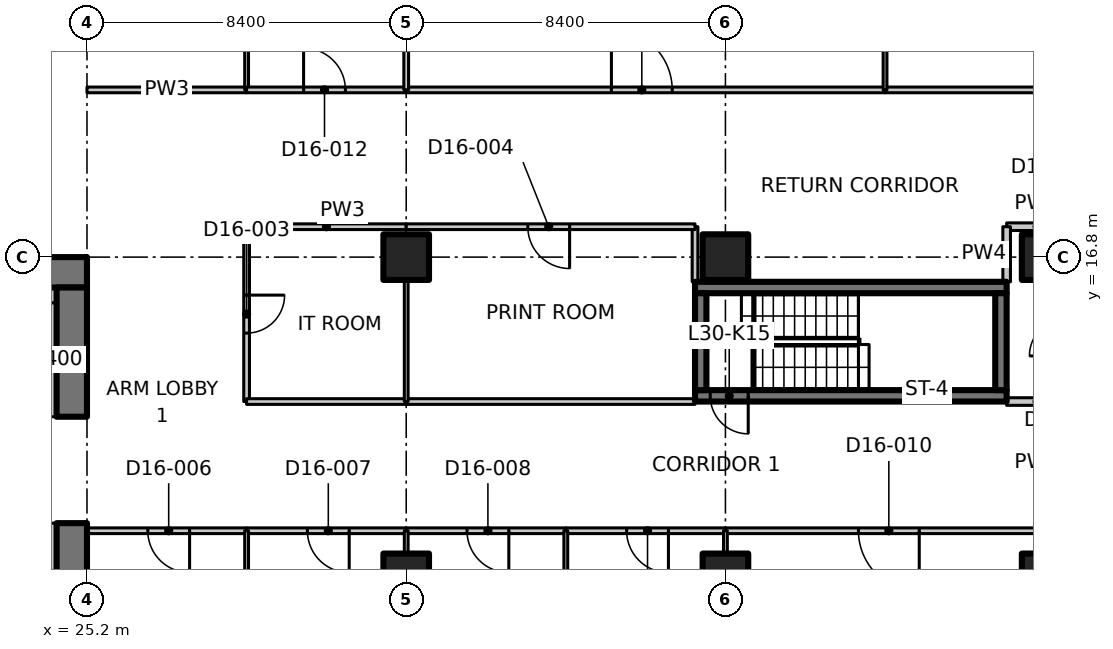
"""IFC4 building model, lengths in metres.
Left out: names, types, materials, properties, quantities, classifications, styles, units other than length and angle.
Written with IfcOpenShell. Run it as: python <this file> out.ifc"""

import sys

from ifc_helpers import new_model, si_unit, direction, frame, frame_2d, origin, origin_2d, place, context, subcontext, project, spatial, polyline, rectangle, outline, extrude, element, fill, save


model = new_model("IFC4")
c1 = context("Model", 3, precision=1e-05, world=origin(), true_north=direction((0.0, 1.0)))
c2 = subcontext(c1, "Body", "Model", "MODEL_VIEW")
j1 = project(units=[si_unit("LENGTHUNIT", "METRE"), si_unit("PLANEANGLEUNIT", "RADIAN")], contexts=[c1])
p1 = place(None, origin())
s1 = spatial("IfcSite", under=j1, at=p1, CompositionType="ELEMENT")
p2 = place(p1, origin())
s2 = spatial("IfcBuilding", under=s1, at=p2, CompositionType="ELEMENT")
p3 = place(p2, frame((0.0, 0.0, 124.1)))
s3 = spatial("IfcBuildingStorey", under=s2, at=p3, CompositionType="ELEMENT", Elevation=124.1)
for number, where, z_axis, x_axis in (
    (1, (33.6, 8.4, 0.0), (0.0, 0.0, 1.0), (1.0, 0.0, 0.0)),
    (2, (33.6, 16.8, 0.0), (0.0, 0.0, 1.0), (1.0, 0.0, 0.0)),
    (3, (42.0, 8.4, 0.0), (0.0, 0.0, 1.0), (1.0, 0.0, 0.0)),
    (4, (42.0, 16.8, 0.0), (0.0, 0.0, 1.0), (1.0, 0.0, 0.0)),
    (5, (50.4, 8.4, 0.0), (0.0, 0.0, 1.0), (1.0, 0.0, 0.0)),
    (6, (50.4, 16.8, 0.0), (0.0, 0.0, 1.0), (1.0, 0.0, 0.0)),
):
    element("IfcColumn", number, at=place(p3, frame(where, z_axis=z_axis, x_axis=x_axis)), inside=s3, PredefinedType="COLUMN", context=c2, shape_type="SweptSolid", body=[
        extrude(rectangle(XDim=1.2, YDim=1.2, at=origin_2d()), origin(), (0.0, 0.0, 1.0), 3.35),
    ])
p4 = place(p3, frame((23.8, 16.4, 0.0), z_axis=(0.0, 0.0, 1.0), x_axis=(1.0, 0.0, 0.0)))
e7 = element("IfcWall", 7, at=p4, inside=s3, PredefinedType="SHEAR", context=c2, shape_type="SweptSolid", body=[
    extrude(rectangle(XDim=1.4, YDim=0.8, at=frame_2d((0.7, 0.0))), origin(), (0.0, 0.0, 1.0), 3.35),
])
p5 = place(p3, frame((24.8, 0.8, 0.0), z_axis=(0.0, 0.0, 1.0), x_axis=(0.0, 1.0, 0.0)))
e8 = element("IfcWall", 8, at=p5, inside=s3, PredefinedType="SHEAR", context=c2, shape_type="SweptSolid", body=[
    extrude(rectangle(XDim=9.0, YDim=0.8, at=frame_2d((4.5, 0.0))), origin(), (0.0, 0.0, 1.0), 3.35),
])
p6 = place(p3, frame((24.8, 12.6, 0.0), z_axis=(0.0, 0.0, 1.0), x_axis=(0.0, 1.0, 0.0)))
e9 = element("IfcWall", 9, at=p6, inside=s3, PredefinedType="SHEAR", context=c2, shape_type="SweptSolid", body=[
    extrude(rectangle(XDim=3.4, YDim=0.8, at=frame_2d((1.7, 0.0))), origin(), (0.0, 0.0, 1.0), 3.35),
])
p7 = place(p3, frame((24.2, 12.6, 0.0), z_axis=(0.0, 0.0, 1.0), x_axis=(0.0, 1.0, 0.0)))
e10 = element("IfcWall", 10, at=p7, inside=s3, PredefinedType="PARTITIONING", context=c2, shape_type="SweptSolid", body=[
    extrude(rectangle(XDim=3.0, YDim=0.4, at=frame_2d((1.5, 0.0))), origin(), (0.0, 0.0, 1.0), 3.35),
])
p8 = place(p3, frame((23.8, 15.8, 0.0), z_axis=(0.0, 0.0, 1.0), x_axis=(1.0, 0.0, 0.0)))
e11 = element("IfcWall", 11, at=p8, inside=s3, PredefinedType="PARTITIONING", context=c2, shape_type="SweptSolid", body=[
    extrude(rectangle(XDim=0.6, YDim=0.4, at=frame_2d((0.3, 0.0))), origin(), (0.0, 0.0, 1.0), 3.35),
])
p9 = place(p3, frame((49.4, 13.15, 0.0), z_axis=(0.0, 0.0, 1.0), x_axis=(-1.0, 0.0, 0.0)))
e12 = element("IfcWall", 12, at=p9, inside=s3, PredefinedType="SHEAR", context=c2, shape_type="SweptSolid", body=[
    extrude(rectangle(XDim=8.2, YDim=0.3, at=frame_2d((4.1, 0.0))), origin(), (0.0, 0.0, 1.0), 3.35),
])
p10 = place(p9, frame((6.8, 0.0, 0.0)))
e13 = element("IfcOpeningElement", 13, at=p10, cuts=e12, PredefinedType="OPENING", context=c2, shape_type="SweptSolid", body=[
    extrude(rectangle(XDim=1.0, YDim=2.1, at=frame_2d((0.5, 1.05))), frame((0.0, 0.16, 0.0), z_axis=(0.0, -1.0, 0.0), x_axis=(1.0, 0.0, 0.0)), (0.0, 0.0, 1.0), 0.32),
])
p11 = place(p3, frame((41.2, 16.0, 0.0), z_axis=(0.0, 0.0, 1.0), x_axis=(1.0, 0.0, 0.0)))
e14 = element("IfcWall", 14, at=p11, inside=s3, PredefinedType="SHEAR", context=c2, shape_type="SweptSolid", body=[
    extrude(rectangle(XDim=8.2, YDim=0.3, at=frame_2d((4.1, 0.0))), origin(), (0.0, 0.0, 1.0), 3.35),
])
for number, where, z_axis, x_axis in (
    (15, (41.35, 13.3, 0.0), (0.0, 0.0, 1.0), (0.0, 1.0, 0.0)),
    (16, (49.25, 13.3, 0.0), (0.0, 0.0, 1.0), (0.0, 1.0, 0.0)),
):
    element("IfcWall", number, at=place(p3, frame(where, z_axis=z_axis, x_axis=x_axis)), inside=s3, PredefinedType="SHEAR", context=c2, shape_type="SweptSolid", body=[
        extrude(rectangle(XDim=2.55, YDim=0.3, at=frame_2d((1.275, 0.0))), origin(), (0.0, 0.0, 1.0), 3.35),
    ])
p12 = place(p3, frame((24.2, 4.35, 0.0), z_axis=(0.0, 0.0, 1.0), x_axis=(0.0, 1.0, 0.0)))
e17 = element("IfcWall", 17, at=p12, inside=s3, PredefinedType="PARTITIONING", context=c2, shape_type="SweptSolid", body=[
    extrude(rectangle(XDim=5.45, YDim=0.4, at=frame_2d((2.725, 0.0))), origin(), (0.0, 0.0, 1.0), 3.35),
])
p13 = place(p3, frame((25.2, 21.2, 0.0), z_axis=(0.0, 0.0, 1.0), x_axis=(1.0, 0.0, 0.0)))
e18 = element("IfcWall", 18, at=p13, inside=s3, PredefinedType="PARTITIONING", context=c2, shape_type="SweptSolid", body=[
    extrude(rectangle(XDim=4.2, YDim=0.15, at=frame_2d((2.1, 0.0))), origin(), (0.0, 0.0, 1.0), 3.33),
])
p14 = place(p3, frame((29.4, 17.6, 0.0), z_axis=(0.0, 0.0, 1.0), x_axis=(0.0, -1.0, 0.0)))
e19 = element("IfcWall", 19, at=p14, inside=s3, PredefinedType="PARTITIONING", context=c2, shape_type="SweptSolid", body=[
    extrude(rectangle(XDim=4.6, YDim=0.15, at=frame_2d((2.3, 0.0))), origin(), (0.0, 0.0, 1.0), 3.33),
])
p15 = place(p14, frame((1.8, 0.0, 0.0)))
e20 = element("IfcOpeningElement", 20, at=p15, cuts=e19, PredefinedType="OPENING", context=c2, shape_type="SweptSolid", body=[
    extrude(rectangle(XDim=1.0, YDim=2.1, at=frame_2d((0.5, 1.05))), frame((0.0, 0.085, 0.0), z_axis=(0.0, -1.0, 0.0), x_axis=(1.0, 0.0, 0.0)), (0.0, 0.0, 1.0), 0.17),
])
p16 = place(p3, frame((29.4, 9.6, 0.0), z_axis=(0.0, 0.0, 1.0), x_axis=(-1.0, 0.0, 0.0)))
e21 = element("IfcWall", 21, at=p16, inside=s3, PredefinedType="PARTITIONING", context=c2, shape_type="SweptSolid", body=[
    extrude(rectangle(XDim=4.2, YDim=0.15, at=frame_2d((2.1, 0.0))), origin(), (0.0, 0.0, 1.0), 3.33),
])
p17 = place(p16, frame((1.5, 0.0, 0.0)))
e22 = element("IfcOpeningElement", 22, at=p17, cuts=e21, PredefinedType="OPENING", context=c2, shape_type="SweptSolid", body=[
    extrude(rectangle(XDim=1.1, YDim=2.1, at=frame_2d((0.55, 1.05))), frame((0.0, 0.085, 0.0), z_axis=(0.0, -1.0, 0.0), x_axis=(1.0, 0.0, 0.0)), (0.0, 0.0, 1.0), 0.17),
])
p18 = place(p3, frame((29.4, 27.429, 0.0), z_axis=(0.0, 0.0, 1.0), x_axis=(0.0, -1.0, 0.0)))
e23 = element("IfcWall", 23, at=p18, inside=s3, PredefinedType="PARTITIONING", context=c2, shape_type="SweptSolid", body=[
    extrude(outline(polyline([(0.0, 0.0), (6.229, 0.0), (6.229, 3.33), (2.679, 3.33), (2.677, 2.98), (1.781, 2.98), (1.779, 3.33), (0.154, 3.33), (0.0, 3.33), (0.0, 0.0)])), frame((0.0, 0.05, 0.0), z_axis=(0.0, -1.0, 0.0), x_axis=(1.0, 0.0, 0.0)), (0.0, 0.0, 1.0), 0.1),
])
p19 = place(p3, frame((29.4, 13.0, 0.0), z_axis=(0.0, 0.0, 1.0), x_axis=(1.0, 0.0, 0.0)))
e24 = element("IfcWall", 24, at=p19, inside=s3, PredefinedType="PARTITIONING", context=c2, shape_type="SweptSolid", body=[
    extrude(rectangle(XDim=4.2, YDim=0.15, at=frame_2d((2.1, 0.0))), origin(), (0.0, 0.0, 1.0), 3.33),
])
p20 = place(p3, frame((33.6, 13.0, 0.0), z_axis=(0.0, 0.0, 1.0), x_axis=(1.0, 0.0, 0.0)))
e25 = element("IfcWall", 25, at=p20, inside=s3, PredefinedType="PARTITIONING", context=c2, shape_type="SweptSolid", body=[
    extrude(rectangle(XDim=7.6, YDim=0.15, at=frame_2d((3.8, 0.0))), origin(), (0.0, 0.0, 1.0), 3.33),
])
p21 = place(p3, frame((49.4, 13.0, 0.0), z_axis=(0.0, 0.0, 1.0), x_axis=(1.0, 0.0, 0.0)))
e26 = element("IfcWall", 26, at=p21, inside=s3, PredefinedType="PARTITIONING", context=c2, shape_type="SweptSolid", body=[
    extrude(rectangle(XDim=1.6, YDim=0.2, at=frame_2d((0.8, 0.0))), origin(), (0.0, 0.0, 1.0), 3.33),
])
p22 = place(p3, frame((33.6, 9.6, 0.0), z_axis=(0.0, 0.0, 1.0), x_axis=(-1.0, 0.0, 0.0)))
e27 = element("IfcWall", 27, at=p22, inside=s3, PredefinedType="PARTITIONING", context=c2, shape_type="SweptSolid", body=[
    extrude(rectangle(XDim=4.2, YDim=0.15, at=frame_2d((2.1, 0.0))), origin(), (0.0, 0.0, 1.0), 3.33),
])
p23 = place(p22, frame((1.5, 0.0, 0.0)))
e28 = element("IfcOpeningElement", 28, at=p23, cuts=e27, PredefinedType="OPENING", context=c2, shape_type="SweptSolid", body=[
    extrude(rectangle(XDim=1.1, YDim=2.1, at=frame_2d((0.55, 1.05))), frame((0.0, 0.085, 0.0), z_axis=(0.0, -1.0, 0.0), x_axis=(1.0, 0.0, 0.0)), (0.0, 0.0, 1.0), 0.17),
])
p24 = place(p3, frame((37.8, 9.6, 0.0), z_axis=(0.0, 0.0, 1.0), x_axis=(-1.0, 0.0, 0.0)))
e29 = element("IfcWall", 29, at=p24, inside=s3, PredefinedType="PARTITIONING", context=c2, shape_type="SweptSolid", body=[
    extrude(rectangle(XDim=4.2, YDim=0.15, at=frame_2d((2.1, 0.0))), origin(), (0.0, 0.0, 1.0), 3.33),
])
p25 = place(p24, frame((1.5, 0.0, 0.0)))
e30 = element("IfcOpeningElement", 30, at=p25, cuts=e29, PredefinedType="OPENING", context=c2, shape_type="SweptSolid", body=[
    extrude(rectangle(XDim=1.1, YDim=2.1, at=frame_2d((0.55, 1.05))), frame((0.0, 0.085, 0.0), z_axis=(0.0, -1.0, 0.0), x_axis=(1.0, 0.0, 0.0)), (0.0, 0.0, 1.0), 0.17),
])
p26 = place(p3, frame((42.0, 9.6, 0.0), z_axis=(0.0, 0.0, 1.0), x_axis=(-1.0, 0.0, 0.0)))
e31 = element("IfcWall", 31, at=p26, inside=s3, PredefinedType="PARTITIONING", context=c2, shape_type="SweptSolid", body=[
    extrude(rectangle(XDim=4.2, YDim=0.15, at=frame_2d((2.1, 0.0))), origin(), (0.0, 0.0, 1.0), 3.33),
])
p27 = place(p26, frame((1.5, 0.0, 0.0)))
e32 = element("IfcOpeningElement", 32, at=p27, cuts=e31, PredefinedType="OPENING", context=c2, shape_type="SweptSolid", body=[
    extrude(rectangle(XDim=1.1, YDim=2.1, at=frame_2d((0.55, 1.05))), frame((0.0, 0.085, 0.0), z_axis=(0.0, -1.0, 0.0), x_axis=(1.0, 0.0, 0.0)), (0.0, 0.0, 1.0), 0.17),
])
p28 = place(p3, frame((50.4, 9.6, 0.0), z_axis=(0.0, 0.0, 1.0), x_axis=(-1.0, 0.0, 0.0)))
e33 = element("IfcWall", 33, at=p28, inside=s3, PredefinedType="PARTITIONING", context=c2, shape_type="SweptSolid", body=[
    extrude(rectangle(XDim=8.4, YDim=0.15, at=frame_2d((4.2, 0.0))), origin(), (0.0, 0.0, 1.0), 3.33),
])
p29 = place(p28, frame((3.3, 0.0, 0.0)))
e34 = element("IfcOpeningElement", 34, at=p29, cuts=e33, PredefinedType="OPENING", context=c2, shape_type="SweptSolid", body=[
    extrude(rectangle(XDim=1.6, YDim=2.1, at=frame_2d((0.8, 1.05))), frame((0.0, 0.085, 0.0), z_axis=(0.0, -1.0, 0.0), x_axis=(1.0, 0.0, 0.0)), (0.0, 0.0, 1.0), 0.17),
])
p30 = place(p3, frame((33.6, 17.6, 0.0), z_axis=(0.0, 0.0, 1.0), x_axis=(-1.0, 0.0, 0.0)))
e35 = element("IfcWall", 35, at=p30, inside=s3, PredefinedType="PARTITIONING", context=c2, shape_type="SweptSolid", body=[
    extrude(rectangle(XDim=4.2, YDim=0.15, at=frame_2d((2.1, 0.0))), origin(), (0.0, 0.0, 1.0), 3.33),
])
p31 = place(p3, frame((41.2, 16.15, 0.0), z_axis=(0.0, 0.0, 1.0), x_axis=(0.0, 1.0, 0.0)))
e36 = element("IfcWall", 36, at=p31, inside=s3, PredefinedType="PARTITIONING", context=c2, shape_type="SweptSolid", body=[
    extrude(rectangle(XDim=1.45, YDim=0.15, at=frame_2d((0.725, 0.0))), origin(), (0.0, 0.0, 1.0), 3.33),
])
p32 = place(p3, frame((41.2, 17.6, 0.0), z_axis=(0.0, 0.0, 1.0), x_axis=(-1.0, 0.0, 0.0)))
e37 = element("IfcWall", 37, at=p32, inside=s3, PredefinedType="PARTITIONING", context=c2, shape_type="SweptSolid", body=[
    extrude(rectangle(XDim=7.6, YDim=0.15, at=frame_2d((3.8, 0.0))), origin(), (0.0, 0.0, 1.0), 3.33),
])
p33 = place(p32, frame((3.3, 0.0, 0.0)))
e38 = element("IfcOpeningElement", 38, at=p33, cuts=e37, PredefinedType="OPENING", context=c2, shape_type="SweptSolid", body=[
    extrude(rectangle(XDim=1.1, YDim=2.1, at=frame_2d((0.55, 1.05))), frame((0.0, 0.085, 0.0), z_axis=(0.0, -1.0, 0.0), x_axis=(1.0, 0.0, 0.0)), (0.0, 0.0, 1.0), 0.17),
])
p34 = place(p3, frame((51.0, 17.6, 0.0), z_axis=(0.0, 0.0, 1.0), x_axis=(-1.0, 0.0, 0.0)))
e39 = element("IfcWall", 39, at=p34, inside=s3, PredefinedType="PARTITIONING", context=c2, shape_type="SweptSolid", body=[
    extrude(rectangle(XDim=1.6, YDim=0.2, at=frame_2d((0.8, 0.0))), origin(), (0.0, 0.0, 1.0), 3.33),
])
p35 = place(p3, frame((49.4, 17.6, 0.0), z_axis=(0.0, 0.0, 1.0), x_axis=(0.0, -1.0, 0.0)))
e40 = element("IfcWall", 40, at=p35, inside=s3, PredefinedType="PARTITIONING", context=c2, shape_type="SweptSolid", body=[
    extrude(rectangle(XDim=1.45, YDim=0.2, at=frame_2d((0.725, 0.0))), origin(), (0.0, 0.0, 1.0), 3.33),
])
p36 = place(p3, frame((29.4, 21.2, 0.0), z_axis=(0.0, 0.0, 1.0), x_axis=(1.0, 0.0, 0.0)))
e41 = element("IfcWall", 41, at=p36, inside=s3, PredefinedType="PARTITIONING", context=c2, shape_type="SweptSolid", body=[
    extrude(rectangle(XDim=4.2, YDim=0.15, at=frame_2d((2.1, 0.0))), origin(), (0.0, 0.0, 1.0), 3.33),
])
p37 = place(p36, frame((1.5, 0.0, 0.0)))
e42 = element("IfcOpeningElement", 42, at=p37, cuts=e41, PredefinedType="OPENING", context=c2, shape_type="SweptSolid", body=[
    extrude(rectangle(XDim=1.1, YDim=2.1, at=frame_2d((0.55, 1.05))), frame((0.0, 0.085, 0.0), z_axis=(0.0, -1.0, 0.0), x_axis=(1.0, 0.0, 0.0)), (0.0, 0.0, 1.0), 0.17),
])
p38 = place(p3, frame((33.6, 21.2, 0.0), z_axis=(0.0, 0.0, 1.0), x_axis=(1.0, 0.0, 0.0)))
e43 = element("IfcWall", 43, at=p38, inside=s3, PredefinedType="PARTITIONING", context=c2, shape_type="SweptSolid", body=[
    extrude(rectangle(XDim=12.6, YDim=0.15, at=frame_2d((6.3, 0.0))), origin(), (0.0, 0.0, 1.0), 3.33),
])
p39 = place(p38, frame((5.4, 0.0, 0.0)))
e44 = element("IfcOpeningElement", 44, at=p39, cuts=e43, PredefinedType="OPENING", context=c2, shape_type="SweptSolid", body=[
    extrude(rectangle(XDim=1.6, YDim=2.1, at=frame_2d((0.8, 1.05))), frame((0.0, 0.085, 0.0), z_axis=(0.0, -1.0, 0.0), x_axis=(1.0, 0.0, 0.0)), (0.0, 0.0, 1.0), 0.17),
])
p40 = place(p3, frame((46.2, 21.2, 0.0), z_axis=(0.0, 0.0, 1.0), x_axis=(1.0, 0.0, 0.0)))
e45 = element("IfcWall", 45, at=p40, inside=s3, PredefinedType="PARTITIONING", context=c2, shape_type="SweptSolid", body=[
    extrude(rectangle(XDim=4.2, YDim=0.15, at=frame_2d((2.1, 0.0))), origin(), (0.0, 0.0, 1.0), 3.33),
])
p41 = place(p3, frame((33.6, 16.18, 0.0), z_axis=(0.0, 0.0, 1.0), x_axis=(0.0, -1.0, 0.0)))
e46 = element("IfcWall", 46, at=p41, inside=s3, PredefinedType="PARTITIONING", context=c2, shape_type="SweptSolid", body=[
    extrude(rectangle(XDim=3.18, YDim=0.1, at=frame_2d((1.59, 0.0))), origin(), (0.0, 0.0, 1.0), 3.33),
])
p42 = place(p3, frame((29.4, 9.6, 0.0), z_axis=(0.0, 0.0, 1.0), x_axis=(0.0, -1.0, 0.0)))
e47 = element("IfcWall", 47, at=p42, inside=s3, PredefinedType="PARTITIONING", context=c2, shape_type="SweptSolid", body=[
    extrude(outline(polyline([(0.0, 0.0), (10.965, 0.0), (10.965, 3.33), (10.7, 3.33), (10.05, 3.33), (10.048, 2.98), (9.152, 2.98), (9.15, 3.33), (0.0, 3.33), (0.0, 0.0)])), frame((0.0, 0.05, 0.0), z_axis=(0.0, -1.0, 0.0), x_axis=(1.0, 0.0, 0.0)), (0.0, 0.0, 1.0), 0.1),
])
p43 = place(p3, frame((33.6, 9.6, 0.0), z_axis=(0.0, 0.0, 1.0), x_axis=(0.0, -1.0, 0.0)))
e48 = element("IfcWall", 48, at=p43, inside=s3, PredefinedType="PARTITIONING", context=c2, shape_type="SweptSolid", body=[
    extrude(rectangle(XDim=0.58, YDim=0.1, at=frame_2d((0.29, 0.0))), origin(), (0.0, 0.0, 1.0), 3.33),
])
p44 = place(p3, frame((37.8, 9.6, 0.0), z_axis=(0.0, 0.0, 1.0), x_axis=(0.0, -1.0, 0.0)))
e49 = element("IfcWall", 49, at=p44, inside=s3, PredefinedType="PARTITIONING", context=c2, shape_type="SweptSolid", body=[
    extrude(outline(polyline([(0.0, 0.0), (10.965, 0.0), (10.965, 3.33), (10.7, 3.33), (10.05, 3.33), (10.048, 2.98), (9.152, 2.98), (9.15, 3.33), (0.0, 3.33), (0.0, 0.0)])), frame((0.0, 0.05, 0.0), z_axis=(0.0, -1.0, 0.0), x_axis=(1.0, 0.0, 0.0)), (0.0, 0.0, 1.0), 0.1),
])
p45 = place(p3, frame((42.0, 9.6, 0.0), z_axis=(0.0, 0.0, 1.0), x_axis=(0.0, -1.0, 0.0)))
e50 = element("IfcWall", 50, at=p45, inside=s3, PredefinedType="PARTITIONING", context=c2, shape_type="SweptSolid", body=[
    extrude(rectangle(XDim=0.58, YDim=0.1, at=frame_2d((0.29, 0.0))), origin(), (0.0, 0.0, 1.0), 3.33),
])
p46 = place(p3, frame((33.6, 24.68, 0.0), z_axis=(0.0, 0.0, 1.0), x_axis=(0.0, -1.0, 0.0)))
e51 = element("IfcWall", 51, at=p46, inside=s3, PredefinedType="PARTITIONING", context=c2, shape_type="SweptSolid", body=[
    extrude(rectangle(XDim=3.48, YDim=0.125, at=frame_2d((1.74, 0.0))), origin(), (0.0, 0.0, 1.0), 3.33),
])
p47 = place(p3, frame((46.2, 26.374, 0.0), z_axis=(0.0, 0.0, 1.0), x_axis=(0.0, -1.0, 0.0)))
e52 = element("IfcWall", 52, at=p47, inside=s3, PredefinedType="PARTITIONING", context=c2, shape_type="SweptSolid", body=[
    extrude(outline(polyline([(0.0, 0.0), (5.174, 0.0), (5.174, 3.33), (1.624, 3.33), (1.622, 2.98), (0.726, 2.98), (0.724, 3.33), (0.074, 3.33), (0.0, 3.33), (0.0, 0.0)])), frame((0.0, 0.05, 0.0), z_axis=(0.0, -1.0, 0.0), x_axis=(1.0, 0.0, 0.0)), (0.0, 0.0, 1.0), 0.1),
])
p48 = place(p47, frame((2.374, 0.0, 0.0)))
e53 = element("IfcOpeningElement", 53, at=p48, cuts=e52, PredefinedType="OPENING", context=c2, shape_type="SweptSolid", body=[
    extrude(rectangle(XDim=1.0, YDim=2.1, at=frame_2d((0.5, 1.05))), frame((0.0, 0.06, 0.0), z_axis=(0.0, -1.0, 0.0), x_axis=(1.0, 0.0, 0.0)), (0.0, 0.0, 1.0), 0.12),
])
p49 = place(p10, origin())
e54 = element("IfcDoor", 54, at=p49, inside=s3, OperationType="SINGLE_SWING_RIGHT", PredefinedType="DOOR", context=c2, shape_type="SweptSolid", body=[
    extrude(rectangle(XDim=1.0, YDim=2.1, at=frame_2d((0.5, 1.05))), frame((0.0, 0.025, 0.0), z_axis=(0.0, -1.0, 0.0), x_axis=(1.0, 0.0, 0.0)), (0.0, 0.0, 1.0), 0.05),
])
fill(e13, e54)
p50 = place(p15, origin())
e55 = element("IfcDoor", 55, at=p50, inside=s3, OperationType="SINGLE_SWING_LEFT", PredefinedType="DOOR", context=c2, shape_type="SweptSolid", body=[
    extrude(rectangle(XDim=1.0, YDim=2.1, at=frame_2d((0.5, 1.05))), frame((0.0, 0.025, 0.0), z_axis=(0.0, -1.0, 0.0), x_axis=(1.0, 0.0, 0.0)), (0.0, 0.0, 1.0), 0.05),
])
fill(e20, e55)
p51 = place(p33, origin())
e56 = element("IfcDoor", 56, at=p51, inside=s3, OperationType="SINGLE_SWING_LEFT", PredefinedType="DOOR", context=c2, shape_type="SweptSolid", body=[
    extrude(rectangle(XDim=1.1, YDim=2.1, at=frame_2d((0.55, 1.05))), frame((0.0, 0.025, 0.0), z_axis=(0.0, -1.0, 0.0), x_axis=(1.0, 0.0, 0.0)), (0.0, 0.0, 1.0), 0.05),
])
fill(e38, e56)
p52 = place(p17, origin())
e57 = element("IfcDoor", 57, at=p52, inside=s3, OperationType="SINGLE_SWING_LEFT", PredefinedType="DOOR", context=c2, shape_type="SweptSolid", body=[
    extrude(rectangle(XDim=1.1, YDim=2.1, at=frame_2d((0.55, 1.05))), frame((0.0, 0.025, 0.0), z_axis=(0.0, -1.0, 0.0), x_axis=(1.0, 0.0, 0.0)), (0.0, 0.0, 1.0), 0.05),
])
fill(e22, e57)
p53 = place(p23, origin())
e58 = element("IfcDoor", 58, at=p53, inside=s3, OperationType="SINGLE_SWING_LEFT", PredefinedType="DOOR", context=c2, shape_type="SweptSolid", body=[
    extrude(rectangle(XDim=1.1, YDim=2.1, at=frame_2d((0.55, 1.05))), frame((0.0, 0.025, 0.0), z_axis=(0.0, -1.0, 0.0), x_axis=(1.0, 0.0, 0.0)), (0.0, 0.0, 1.0), 0.05),
])
fill(e28, e58)
p54 = place(p25, origin())
e59 = element("IfcDoor", 59, at=p54, inside=s3, OperationType="SINGLE_SWING_LEFT", PredefinedType="DOOR", context=c2, shape_type="SweptSolid", body=[
    extrude(rectangle(XDim=1.1, YDim=2.1, at=frame_2d((0.55, 1.05))), frame((0.0, 0.025, 0.0), z_axis=(0.0, -1.0, 0.0), x_axis=(1.0, 0.0, 0.0)), (0.0, 0.0, 1.0), 0.05),
])
fill(e30, e59)
p55 = place(p27, origin())
e60 = element("IfcDoor", 60, at=p55, inside=s3, OperationType="SINGLE_SWING_LEFT", PredefinedType="DOOR", context=c2, shape_type="SweptSolid", body=[
    extrude(rectangle(XDim=1.1, YDim=2.1, at=frame_2d((0.55, 1.05))), frame((0.0, 0.025, 0.0), z_axis=(0.0, -1.0, 0.0), x_axis=(1.0, 0.0, 0.0)), (0.0, 0.0, 1.0), 0.05),
])
fill(e32, e60)
p56 = place(p29, origin())
e61 = element("IfcDoor", 61, at=p56, inside=s3, OperationType="DOUBLE_DOOR_SINGLE_SWING", PredefinedType="DOOR", context=c2, shape_type="SweptSolid", body=[
    extrude(rectangle(XDim=1.6, YDim=2.1, at=frame_2d((0.8, 1.05))), frame((0.0, 0.025, 0.0), z_axis=(0.0, -1.0, 0.0), x_axis=(1.0, 0.0, 0.0)), (0.0, 0.0, 1.0), 0.05),
])
fill(e34, e61)
p57 = place(p37, origin())
e62 = element("IfcDoor", 62, at=p57, inside=s3, OperationType="SINGLE_SWING_LEFT", PredefinedType="DOOR", context=c2, shape_type="SweptSolid", body=[
    extrude(rectangle(XDim=1.1, YDim=2.1, at=frame_2d((0.55, 1.05))), frame((0.0, 0.025, 0.0), z_axis=(0.0, -1.0, 0.0), x_axis=(1.0, 0.0, 0.0)), (0.0, 0.0, 1.0), 0.05),
])
fill(e42, e62)
p58 = place(p39, origin())
e63 = element("IfcDoor", 63, at=p58, inside=s3, OperationType="DOUBLE_DOOR_SINGLE_SWING", PredefinedType="DOOR", context=c2, shape_type="SweptSolid", body=[
    extrude(rectangle(XDim=1.6, YDim=2.1, at=frame_2d((0.8, 1.05))), frame((0.0, 0.025, 0.0), z_axis=(0.0, -1.0, 0.0), x_axis=(1.0, 0.0, 0.0)), (0.0, 0.0, 1.0), 0.05),
])
fill(e44, e63)
save(model, sys.argv[1])
